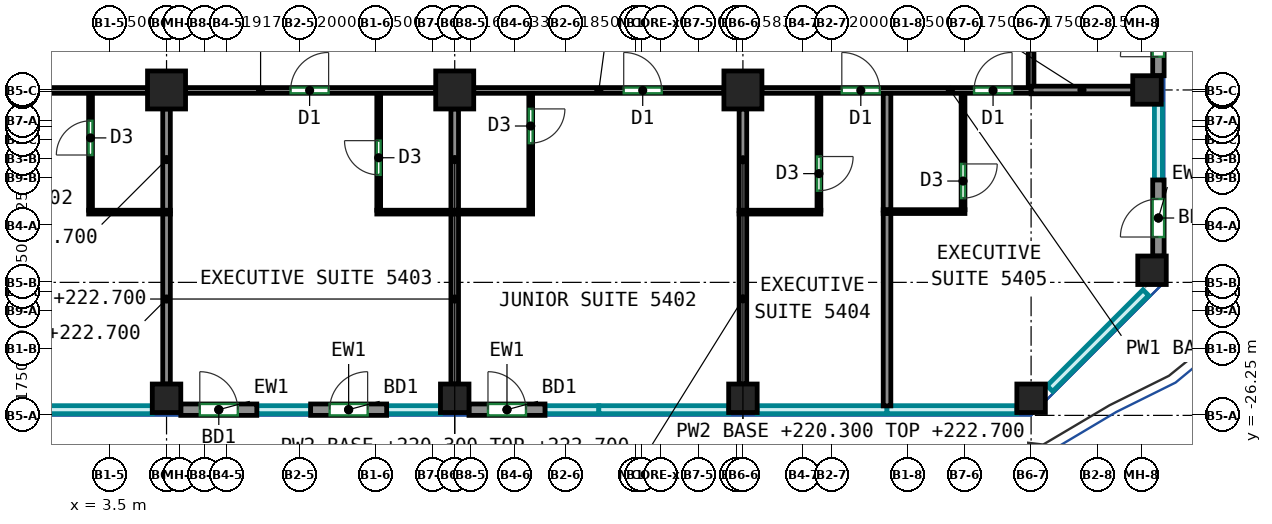
"""IFC4 building model, lengths in metres.
Left out: names, types, materials, properties, quantities, classifications, styles, units other than length and angle.
Written with IfcOpenShell. Run it as: python <this file> out.ifc"""

import sys

from ifc_helpers import new_model, si_unit, direction, frame, frame_2d, origin, origin_2d, place, context, subcontext, project, spatial, rectangle, extrude, source, transform, mapped, element, fill, save


model = new_model("IFC4")
c1 = context("Model", 3, precision=1e-05, world=origin(), true_north=direction((0.0, 1.0)))
c2 = subcontext(c1, "Body", "Model", "MODEL_VIEW")
j1 = project(units=[si_unit("LENGTHUNIT", "METRE"), si_unit("PLANEANGLEUNIT", "RADIAN")], contexts=[c1])
p1 = place(None, origin())
s1 = spatial("IfcSite", under=j1, at=p1, CompositionType="ELEMENT")
p2 = place(p1, origin())
s2 = spatial("IfcBuilding", under=s1, at=p2, CompositionType="ELEMENT")
p3 = place(p2, frame((0.0, 0.0, 220.3)))
s3 = spatial("IfcBuildingStorey", under=s2, at=p3, CompositionType="ELEMENT", Elevation=220.3)
m1 = source(origin(), c2, "Body", "SweptSolid", [
    extrude(rectangle(XDim=0.75, YDim=0.75, at=origin_2d()), origin(), (0.0, 0.0, 1.0), 3.0),
])
p4 = place(p3, frame((5.0, -25.8, 0.0), z_axis=(0.0, 0.0, 1.0), x_axis=(1.0, 0.0, 0.0)))
e1 = element("IfcColumn", 1, at=p4, inside=s3, PredefinedType="COLUMN", context=c2, shape_type="MappedRepresentation", body=[
    mapped(m1, transform((0.0, 0.0, 0.0))),
])
m2 = source(origin(), c2, "Body", "SweptSolid", [
    extrude(rectangle(XDim=1.0, YDim=1.0, at=origin_2d()), origin(), (0.0, 0.0, 1.0), 3.0),
])
p5 = place(p3, frame((5.0, -17.688, 0.0), z_axis=(0.0, 0.0, 1.0), x_axis=(1.0, 0.0, 0.0)))
e2 = element("IfcColumn", 2, at=p5, inside=s3, PredefinedType="COLUMN", context=c2, shape_type="MappedRepresentation", body=[
    mapped(m2, transform((0.0, 0.0, 0.0))),
])
p6 = place(p3, frame((12.583, -25.8, 0.0), z_axis=(0.0, 0.0, 1.0), x_axis=(1.0, 0.0, 0.0)))
e3 = element("IfcColumn", 3, at=p6, inside=s3, PredefinedType="COLUMN", context=c2, shape_type="MappedRepresentation", body=[
    mapped(m1, transform((0.0, 0.0, 0.0))),
])
p7 = place(p3, frame((12.583, -17.688, 0.0), z_axis=(0.0, 0.0, 1.0), x_axis=(1.0, 0.0, 0.0)))
e4 = element("IfcColumn", 4, at=p7, inside=s3, PredefinedType="COLUMN", context=c2, shape_type="MappedRepresentation", body=[
    mapped(m2, transform((0.0, 0.0, 0.0))),
])
p8 = place(p3, frame((20.167, -25.8, 0.0), z_axis=(0.0, 0.0, 1.0), x_axis=(1.0, 0.0, 0.0)))
e5 = element("IfcColumn", 5, at=p8, inside=s3, PredefinedType="COLUMN", context=c2, shape_type="MappedRepresentation", body=[
    mapped(m1, transform((0.0, 0.0, 0.0))),
])
p9 = place(p3, frame((20.167, -17.688, 0.0), z_axis=(0.0, 0.0, 1.0), x_axis=(1.0, 0.0, 0.0)))
e6 = element("IfcColumn", 6, at=p9, inside=s3, PredefinedType="COLUMN", context=c2, shape_type="MappedRepresentation", body=[
    mapped(m2, transform((0.0, 0.0, 0.0))),
])
for number, where, z_axis, x_axis in (
    (7, (27.75, -25.8, 0.0), (0.0, 0.0, 1.0), (1.0, 0.0, 0.0)),
    (8, (30.8, -17.688, 0.0), (0.0, 0.0, 1.0), (1.0, 0.0, 0.0)),
    (9, (30.932, -22.432, 0.0), (0.0, 0.0, 1.0), (1.0, 0.0, 0.0)),
):
    element("IfcColumn", number, at=place(p3, frame(where, z_axis=z_axis, x_axis=x_axis)), inside=s3, PredefinedType="COLUMN", context=c2, shape_type="MappedRepresentation", body=[
        mapped(m1, transform((0.0, 0.0, 0.0))),
    ])
m3 = source(origin(), c2, "Body", "SweptSolid", [
    extrude(rectangle(XDim=2.0, YDim=0.3, at=frame_2d((1.0, 0.0))), origin(), (0.0, 0.0, 1.0), 3.0),
])
p10 = place(p3, frame((5.375, -26.1, 0.0), z_axis=(0.0, 0.0, 1.0), x_axis=(1.0, 0.0, 0.0)))
e10 = element("IfcWall", 10, at=p10, inside=s3, PredefinedType="SOLIDWALL", context=c2, shape_type="MappedRepresentation", body=[
    mapped(m3, transform((0.0, 0.0, 0.0))),
])
p11 = place(p10, frame((0.5, 0.0, 0.0)))
e11 = element("IfcOpeningElement", 11, at=p11, cuts=e10, PredefinedType="OPENING", context=c2, shape_type="SweptSolid", body=[
    extrude(rectangle(XDim=1.0, YDim=2.1, at=frame_2d((0.5, 1.05))), frame((0.0, 0.16, 0.0), z_axis=(0.0, -1.0, 0.0), x_axis=(1.0, 0.0, 0.0)), (0.0, 0.0, 1.0), 0.32),
])
p12 = place(p3, frame((8.792, -26.1, 0.0), z_axis=(0.0, 0.0, 1.0), x_axis=(1.0, 0.0, 0.0)))
e12 = element("IfcWall", 12, at=p12, inside=s3, PredefinedType="SOLIDWALL", context=c2, shape_type="MappedRepresentation", body=[
    mapped(m3, transform((0.0, 0.0, 0.0))),
])
p13 = place(p12, frame((0.5, 0.0, 0.0)))
e13 = element("IfcOpeningElement", 13, at=p13, cuts=e12, PredefinedType="OPENING", context=c2, shape_type="SweptSolid", body=[
    extrude(rectangle(XDim=1.0, YDim=2.1, at=frame_2d((0.5, 1.05))), frame((0.0, 0.16, 0.0), z_axis=(0.0, -1.0, 0.0), x_axis=(1.0, 0.0, 0.0)), (0.0, 0.0, 1.0), 0.32),
])
p14 = place(p3, frame((12.958, -26.1, 0.0), z_axis=(0.0, 0.0, 1.0), x_axis=(1.0, 0.0, 0.0)))
e14 = element("IfcWall", 14, at=p14, inside=s3, PredefinedType="SOLIDWALL", context=c2, shape_type="MappedRepresentation", body=[
    mapped(m3, transform((0.0, 0.0, 0.0))),
])
p15 = place(p14, frame((0.5, 0.0, 0.0)))
e15 = element("IfcOpeningElement", 15, at=p15, cuts=e14, PredefinedType="OPENING", context=c2, shape_type="SweptSolid", body=[
    extrude(rectangle(XDim=1.0, YDim=2.1, at=frame_2d((0.5, 1.05))), frame((0.0, 0.16, 0.0), z_axis=(0.0, -1.0, 0.0), x_axis=(1.0, 0.0, 0.0)), (0.0, 0.0, 1.0), 0.32),
])
p16 = place(p3, frame((31.1, -22.057, 0.0), z_axis=(0.0, 0.0, 1.0), x_axis=(0.0, 1.0, 0.0)))
e16 = element("IfcWall", 16, at=p16, inside=s3, PredefinedType="SOLIDWALL", context=c2, shape_type="MappedRepresentation", body=[
    mapped(m3, transform((0.0, 0.0, 0.0))),
])
p17 = place(p16, frame((0.5, 0.0, 0.0)))
e17 = element("IfcOpeningElement", 17, at=p17, cuts=e16, PredefinedType="OPENING", context=c2, shape_type="SweptSolid", body=[
    extrude(rectangle(XDim=1.0, YDim=2.1, at=frame_2d((0.5, 1.05))), frame((0.0, 0.16, 0.0), z_axis=(0.0, -1.0, 0.0), x_axis=(1.0, 0.0, 0.0)), (0.0, 0.0, 1.0), 0.32),
])
p18 = place(p3, frame((31.1, -17.312, 0.0), z_axis=(0.0, 0.0, 1.0), x_axis=(0.0, 1.0, 0.0)))
e18 = element("IfcWall", 18, at=p18, inside=s3, PredefinedType="SOLIDWALL", context=c2, shape_type="MappedRepresentation", body=[
    mapped(m3, transform((0.0, 0.0, 0.0))),
])
p19 = place(p18, frame((0.5, 0.0, 0.0)))
e19 = element("IfcOpeningElement", 19, at=p19, cuts=e18, PredefinedType="OPENING", context=c2, shape_type="SweptSolid", body=[
    extrude(rectangle(XDim=1.0, YDim=2.1, at=frame_2d((0.5, 1.05))), frame((0.0, 0.16, 0.0), z_axis=(0.0, -1.0, 0.0), x_axis=(1.0, 0.0, 0.0)), (0.0, 0.0, 1.0), 0.32),
])
p20 = place(p3, frame((-2.083, -17.7, 0.0), z_axis=(0.0, 0.0, 1.0), x_axis=(1.0, 0.0, 0.0)))
e20 = element("IfcWall", 20, at=p20, inside=s3, PredefinedType="PARTITIONING", context=c2, shape_type="SweptSolid", body=[
    extrude(rectangle(XDim=6.583, YDim=0.15, at=frame_2d((3.292, 0.0))), origin(), (0.0, 0.0, 1.0), 2.4),
])
p21 = place(p20, frame((1.021, 0.0, 0.0)))
e21 = element("IfcOpeningElement", 21, at=p21, cuts=e20, PredefinedType="OPENING", context=c2, shape_type="SweptSolid", body=[
    extrude(rectangle(XDim=1.0, YDim=2.1, at=frame_2d((0.5, 1.05))), frame((0.0, 0.085, 0.0), z_axis=(0.0, -1.0, 0.0), x_axis=(1.0, 0.0, 0.0)), (0.0, 0.0, 1.0), 0.17),
])
p22 = place(p3, frame((5.5, -17.7, 0.0), z_axis=(0.0, 0.0, 1.0), x_axis=(1.0, 0.0, 0.0)))
e22 = element("IfcWall", 22, at=p22, inside=s3, PredefinedType="PARTITIONING", context=c2, shape_type="SweptSolid", body=[
    extrude(rectangle(XDim=6.583, YDim=0.15, at=frame_2d((3.292, 0.0))), origin(), (0.0, 0.0, 1.0), 2.4),
])
p23 = place(p22, frame((2.765, 0.0, 0.0)))
e23 = element("IfcOpeningElement", 23, at=p23, cuts=e22, PredefinedType="OPENING", context=c2, shape_type="SweptSolid", body=[
    extrude(rectangle(XDim=1.0, YDim=2.1, at=frame_2d((0.5, 1.05))), frame((0.0, 0.085, 0.0), z_axis=(0.0, -1.0, 0.0), x_axis=(1.0, 0.0, 0.0)), (0.0, 0.0, 1.0), 0.17),
])
p24 = place(p3, frame((13.083, -17.7, 0.0), z_axis=(0.0, 0.0, 1.0), x_axis=(1.0, 0.0, 0.0)))
e24 = element("IfcWall", 24, at=p24, inside=s3, PredefinedType="PARTITIONING", context=c2, shape_type="SweptSolid", body=[
    extrude(rectangle(XDim=6.584, YDim=0.15, at=frame_2d((3.292, 0.0))), origin(), (0.0, 0.0, 1.0), 2.4),
])
p25 = place(p24, frame((3.947, 0.0, 0.0)))
e25 = element("IfcOpeningElement", 25, at=p25, cuts=e24, PredefinedType="OPENING", context=c2, shape_type="SweptSolid", body=[
    extrude(rectangle(XDim=1.0, YDim=2.1, at=frame_2d((0.5, 1.05))), frame((0.0, 0.085, 0.0), z_axis=(0.0, -1.0, 0.0), x_axis=(1.0, 0.0, 0.0)), (0.0, 0.0, 1.0), 0.17),
])
p26 = place(p3, frame((20.667, -17.7, 0.0), z_axis=(0.0, 0.0, 1.0), x_axis=(1.0, 0.0, 0.0)))
e26 = element("IfcWall", 26, at=p26, inside=s3, PredefinedType="PARTITIONING", context=c2, shape_type="SweptSolid", body=[
    extrude(rectangle(XDim=7.083, YDim=0.15, at=frame_2d((3.542, 0.0))), origin(), (0.0, 0.0, 1.0), 2.4),
])
p27 = place(p26, frame((2.102, 0.0, 0.0)))
e27 = element("IfcOpeningElement", 27, at=p27, cuts=e26, PredefinedType="OPENING", context=c2, shape_type="SweptSolid", body=[
    extrude(rectangle(XDim=1.0, YDim=2.1, at=frame_2d((0.5, 1.05))), frame((0.0, 0.085, 0.0), z_axis=(0.0, -1.0, 0.0), x_axis=(1.0, 0.0, 0.0)), (0.0, 0.0, 1.0), 0.17),
])
p28 = place(p26, frame((5.582, 0.0, 0.0)))
e28 = element("IfcOpeningElement", 28, at=p28, cuts=e26, PredefinedType="OPENING", context=c2, shape_type="SweptSolid", body=[
    extrude(rectangle(XDim=1.0, YDim=2.1, at=frame_2d((0.5, 1.05))), frame((0.0, 0.085, 0.0), z_axis=(0.0, -1.0, 0.0), x_axis=(1.0, 0.0, 0.0)), (0.0, 0.0, 1.0), 0.17),
])
p29 = place(p3, frame((27.75, -17.598, 0.0), z_axis=(0.0, 0.0, 1.0), x_axis=(0.0, 1.0, 0.0)))
e29 = element("IfcWall", 29, at=p29, inside=s3, PredefinedType="PARTITIONING", context=c2, shape_type="SweptSolid", body=[
    extrude(rectangle(XDim=2.023, YDim=0.15, at=frame_2d((1.011, 0.0))), origin(), (0.0, 0.0, 1.0), 2.4),
])
p30 = place(p3, frame((3.0, -20.852, 0.0), z_axis=(0.0, 0.0, 1.0), x_axis=(0.0, 1.0, 0.0)))
e30 = element("IfcWall", 30, at=p30, inside=s3, PredefinedType="PARTITIONING", context=c2, shape_type="SweptSolid", body=[
    extrude(rectangle(XDim=3.075, YDim=0.1, at=frame_2d((1.538, 0.0))), origin(), (0.0, 0.0, 1.0), 3.0),
])
p31 = place(p30, frame((1.453, 0.0, 0.0)))
e31 = element("IfcOpeningElement", 31, at=p31, cuts=e30, PredefinedType="OPENING", context=c2, shape_type="SweptSolid", body=[
    extrude(rectangle(XDim=0.9, YDim=2.1, at=frame_2d((0.45, 1.05))), frame((0.0, 0.06, 0.0), z_axis=(0.0, -1.0, 0.0), x_axis=(1.0, 0.0, 0.0)), (0.0, 0.0, 1.0), 0.12),
])
p32 = place(p3, frame((2.95, -20.902, 0.0), z_axis=(0.0, 0.0, 1.0), x_axis=(1.0, 0.0, 0.0)))
e32 = element("IfcWall", 32, at=p32, inside=s3, PredefinedType="PARTITIONING", context=c2, shape_type="SweptSolid", body=[
    extrude(rectangle(XDim=2.15, YDim=0.1, at=frame_2d((1.075, 0.0))), origin(), (0.0, 0.0, 1.0), 3.0),
])
p33 = place(p3, frame((5.0, -25.425, 0.0), z_axis=(0.0, 0.0, 1.0), x_axis=(0.0, 1.0, 0.0)))
e33 = element("IfcWall", 33, at=p33, inside=s3, PredefinedType="PARTITIONING", context=c2, shape_type="SweptSolid", body=[
    extrude(rectangle(XDim=4.473, YDim=0.2, at=frame_2d((2.237, 0.0))), origin(), (0.0, 0.0, 1.0), 2.4),
])
p34 = place(p3, frame((5.0, -20.852, 0.0), z_axis=(0.0, 0.0, 1.0), x_axis=(0.0, 1.0, 0.0)))
e34 = element("IfcWall", 34, at=p34, inside=s3, PredefinedType="PARTITIONING", context=c2, shape_type="SweptSolid", body=[
    extrude(rectangle(XDim=2.664, YDim=0.2, at=frame_2d((1.332, 0.0))), origin(), (0.0, 0.0, 1.0), 2.4),
])
p35 = place(p3, frame((10.583, -20.852, 0.0), z_axis=(0.0, 0.0, 1.0), x_axis=(0.0, 1.0, 0.0)))
e35 = element("IfcWall", 35, at=p35, inside=s3, PredefinedType="PARTITIONING", context=c2, shape_type="SweptSolid", body=[
    extrude(rectangle(XDim=3.075, YDim=0.1, at=frame_2d((1.538, 0.0))), origin(), (0.0, 0.0, 1.0), 3.0),
])
p36 = place(p35, frame((0.931, 0.0, 0.0)))
e36 = element("IfcOpeningElement", 36, at=p36, cuts=e35, PredefinedType="OPENING", context=c2, shape_type="SweptSolid", body=[
    extrude(rectangle(XDim=0.9, YDim=2.1, at=frame_2d((0.45, 1.05))), frame((0.0, 0.06, 0.0), z_axis=(0.0, -1.0, 0.0), x_axis=(1.0, 0.0, 0.0)), (0.0, 0.0, 1.0), 0.12),
])
p37 = place(p3, frame((10.533, -20.902, 0.0), z_axis=(0.0, 0.0, 1.0), x_axis=(1.0, 0.0, 0.0)))
e37 = element("IfcWall", 37, at=p37, inside=s3, PredefinedType="PARTITIONING", context=c2, shape_type="SweptSolid", body=[
    extrude(rectangle(XDim=4.1, YDim=0.1, at=frame_2d((2.05, 0.0))), origin(), (0.0, 0.0, 1.0), 3.0),
])
p38 = place(p3, frame((12.583, -25.425, 0.0), z_axis=(0.0, 0.0, 1.0), x_axis=(0.0, 1.0, 0.0)))
e38 = element("IfcWall", 38, at=p38, inside=s3, PredefinedType="PARTITIONING", context=c2, shape_type="SweptSolid", body=[
    extrude(rectangle(XDim=4.473, YDim=0.2, at=frame_2d((2.237, 0.0))), origin(), (0.0, 0.0, 1.0), 2.4),
])
p39 = place(p3, frame((12.583, -20.852, 0.0), z_axis=(0.0, 0.0, 1.0), x_axis=(0.0, 1.0, 0.0)))
e39 = element("IfcWall", 39, at=p39, inside=s3, PredefinedType="PARTITIONING", context=c2, shape_type="SweptSolid", body=[
    extrude(rectangle(XDim=2.664, YDim=0.2, at=frame_2d((1.332, 0.0))), origin(), (0.0, 0.0, 1.0), 2.4),
])
p40 = place(p3, frame((14.583, -17.777, 0.0), z_axis=(0.0, 0.0, 1.0), x_axis=(0.0, -1.0, 0.0)))
e40 = element("IfcWall", 40, at=p40, inside=s3, PredefinedType="PARTITIONING", context=c2, shape_type="SweptSolid", body=[
    extrude(rectangle(XDim=3.075, YDim=0.1, at=frame_2d((1.538, 0.0))), origin(), (0.0, 0.0, 1.0), 3.0),
])
p41 = place(p40, frame((0.409, 0.0, 0.0)))
e41 = element("IfcOpeningElement", 41, at=p41, cuts=e40, PredefinedType="OPENING", context=c2, shape_type="SweptSolid", body=[
    extrude(rectangle(XDim=0.9, YDim=2.1, at=frame_2d((0.45, 1.05))), frame((0.0, 0.06, 0.0), z_axis=(0.0, -1.0, 0.0), x_axis=(1.0, 0.0, 0.0)), (0.0, 0.0, 1.0), 0.12),
])
p42 = place(p3, frame((20.167, -25.425, 0.0), z_axis=(0.0, 0.0, 1.0), x_axis=(0.0, 1.0, 0.0)))
e42 = element("IfcWall", 42, at=p42, inside=s3, PredefinedType="PARTITIONING", context=c2, shape_type="SweptSolid", body=[
    extrude(rectangle(XDim=4.483, YDim=0.2, at=frame_2d((2.242, 0.0))), origin(), (0.0, 0.0, 1.0), 2.4),
])
p43 = place(p3, frame((20.167, -20.862, 0.0), z_axis=(0.0, 0.0, 1.0), x_axis=(0.0, 1.0, 0.0)))
e43 = element("IfcWall", 43, at=p43, inside=s3, PredefinedType="PARTITIONING", context=c2, shape_type="SweptSolid", body=[
    extrude(rectangle(XDim=2.674, YDim=0.2, at=frame_2d((1.337, 0.0))), origin(), (0.0, 0.0, 1.0), 2.4),
])
p44 = place(p3, frame((22.167, -17.777, 0.0), z_axis=(0.0, 0.0, 1.0), x_axis=(0.0, -1.0, 0.0)))
e44 = element("IfcWall", 44, at=p44, inside=s3, PredefinedType="PARTITIONING", context=c2, shape_type="SweptSolid", body=[
    extrude(rectangle(XDim=3.075, YDim=0.1, at=frame_2d((1.538, 0.0))), origin(), (0.0, 0.0, 1.0), 3.0),
])
p45 = place(p44, frame((1.662, 0.0, 0.0)))
e45 = element("IfcOpeningElement", 45, at=p45, cuts=e44, PredefinedType="OPENING", context=c2, shape_type="SweptSolid", body=[
    extrude(rectangle(XDim=0.9, YDim=2.1, at=frame_2d((0.45, 1.05))), frame((0.0, 0.06, 0.0), z_axis=(0.0, -1.0, 0.0), x_axis=(1.0, 0.0, 0.0)), (0.0, 0.0, 1.0), 0.12),
])
p46 = place(p3, frame((20.067, -20.902, 0.0), z_axis=(0.0, 0.0, 1.0), x_axis=(1.0, 0.0, 0.0)))
e46 = element("IfcWall", 46, at=p46, inside=s3, PredefinedType="PARTITIONING", context=c2, shape_type="SweptSolid", body=[
    extrude(rectangle(XDim=2.15, YDim=0.1, at=frame_2d((1.075, 0.0))), origin(), (0.0, 0.0, 1.0), 3.0),
])
p47 = place(p3, frame((23.959, -26.0, 0.0), z_axis=(0.0, 0.0, 1.0), x_axis=(0.0, 1.0, 0.0)))
e47 = element("IfcWall", 47, at=p47, inside=s3, PredefinedType="PARTITIONING", context=c2, shape_type="SweptSolid", body=[
    extrude(rectangle(XDim=5.072, YDim=0.2, at=frame_2d((2.536, 0.0))), origin(), (0.0, 0.0, 1.0), 3.0),
])
p48 = place(p3, frame((23.959, -20.848, 0.0), z_axis=(0.0, 0.0, 1.0), x_axis=(0.0, 1.0, 0.0)))
e48 = element("IfcWall", 48, at=p48, inside=s3, PredefinedType="PARTITIONING", context=c2, shape_type="SweptSolid", body=[
    extrude(rectangle(XDim=3.071, YDim=0.2, at=frame_2d((1.535, 0.0))), origin(), (0.0, 0.0, 1.0), 3.0),
])
p49 = place(p3, frame((23.859, -20.888, 0.0), z_axis=(0.0, 0.0, 1.0), x_axis=(1.0, 0.0, 0.0)))
e49 = element("IfcWall", 49, at=p49, inside=s3, PredefinedType="PARTITIONING", context=c2, shape_type="SweptSolid", body=[
    extrude(rectangle(XDim=2.15, YDim=0.1, at=frame_2d((1.075, 0.0))), origin(), (0.0, 0.0, 1.0), 3.0),
])
p50 = place(p3, frame((25.959, -17.777, 0.0), z_axis=(0.0, 0.0, 1.0), x_axis=(0.0, -1.0, 0.0)))
e50 = element("IfcWall", 50, at=p50, inside=s3, PredefinedType="PARTITIONING", context=c2, shape_type="SweptSolid", body=[
    extrude(rectangle(XDim=3.061, YDim=0.1, at=frame_2d((1.53, 0.0))), origin(), (0.0, 0.0, 1.0), 3.0),
])
p51 = place(p50, frame((1.857, 0.0, 0.0)))
e51 = element("IfcOpeningElement", 51, at=p51, cuts=e50, PredefinedType="OPENING", context=c2, shape_type="SweptSolid", body=[
    extrude(rectangle(XDim=0.9, YDim=2.1, at=frame_2d((0.45, 1.05))), frame((0.0, 0.06, 0.0), z_axis=(0.0, -1.0, 0.0), x_axis=(1.0, 0.0, 0.0)), (0.0, 0.0, 1.0), 0.12),
])
p52 = place(p3, frame((27.752, -17.688, 0.0), z_axis=(0.0, 0.0, 1.0), x_axis=(1.0, 0.0, 0.0)))
e52 = element("IfcWall", 52, at=p52, inside=s3, PredefinedType="PARTITIONING", context=c2, shape_type="SweptSolid", body=[
    extrude(rectangle(XDim=2.673, YDim=0.2, at=frame_2d((1.336, 0.0))), origin(), (0.0, 0.0, 1.0), 2.4),
])
p53 = place(p11, origin())
e53 = element("IfcDoor", 53, at=p53, inside=s3, OperationType="SINGLE_SWING_LEFT", PredefinedType="DOOR", context=c2, shape_type="SweptSolid", body=[
    extrude(rectangle(XDim=1.0, YDim=2.1, at=frame_2d((0.5, 1.05))), frame((0.0, 0.025, 0.0), z_axis=(0.0, -1.0, 0.0), x_axis=(1.0, 0.0, 0.0)), (0.0, 0.0, 1.0), 0.05),
])
fill(e11, e53)
p54 = place(p13, origin())
e54 = element("IfcDoor", 54, at=p54, inside=s3, OperationType="SINGLE_SWING_RIGHT", PredefinedType="DOOR", context=c2, shape_type="SweptSolid", body=[
    extrude(rectangle(XDim=1.0, YDim=2.1, at=frame_2d((0.5, 1.05))), frame((0.0, 0.025, 0.0), z_axis=(0.0, -1.0, 0.0), x_axis=(1.0, 0.0, 0.0)), (0.0, 0.0, 1.0), 0.05),
])
fill(e13, e54)
p55 = place(p15, origin())
e55 = element("IfcDoor", 55, at=p55, inside=s3, OperationType="SINGLE_SWING_LEFT", PredefinedType="DOOR", context=c2, shape_type="SweptSolid", body=[
    extrude(rectangle(XDim=1.0, YDim=2.1, at=frame_2d((0.5, 1.05))), frame((0.0, 0.025, 0.0), z_axis=(0.0, -1.0, 0.0), x_axis=(1.0, 0.0, 0.0)), (0.0, 0.0, 1.0), 0.05),
])
fill(e15, e55)
p56 = place(p17, origin())
e56 = element("IfcDoor", 56, at=p56, inside=s3, OperationType="SINGLE_SWING_LEFT", PredefinedType="DOOR", context=c2, shape_type="SweptSolid", body=[
    extrude(rectangle(XDim=1.0, YDim=2.1, at=frame_2d((0.5, 1.05))), frame((0.0, 0.025, 0.0), z_axis=(0.0, -1.0, 0.0), x_axis=(1.0, 0.0, 0.0)), (0.0, 0.0, 1.0), 0.05),
])
fill(e17, e56)
p57 = place(p19, origin())
e57 = element("IfcDoor", 57, at=p57, inside=s3, OperationType="SINGLE_SWING_LEFT", PredefinedType="DOOR", context=c2, shape_type="SweptSolid", body=[
    extrude(rectangle(XDim=1.0, YDim=2.1, at=frame_2d((0.5, 1.05))), frame((0.0, 0.025, 0.0), z_axis=(0.0, -1.0, 0.0), x_axis=(1.0, 0.0, 0.0)), (0.0, 0.0, 1.0), 0.05),
])
fill(e19, e57)
p58 = place(p51, origin())
e58 = element("IfcDoor", 58, at=p58, inside=s3, OperationType="SINGLE_SWING_LEFT", PredefinedType="DOOR", context=c2, shape_type="SweptSolid", body=[
    extrude(rectangle(XDim=0.9, YDim=2.1, at=frame_2d((0.45, 1.05))), frame((0.0, 0.025, 0.0), z_axis=(0.0, -1.0, 0.0), x_axis=(1.0, 0.0, 0.0)), (0.0, 0.0, 1.0), 0.05),
])
fill(e51, e58)
p59 = place(p45, origin())
e59 = element("IfcDoor", 59, at=p59, inside=s3, OperationType="SINGLE_SWING_LEFT", PredefinedType="DOOR", context=c2, shape_type="SweptSolid", body=[
    extrude(rectangle(XDim=0.9, YDim=2.1, at=frame_2d((0.45, 1.05))), frame((0.0, 0.025, 0.0), z_axis=(0.0, -1.0, 0.0), x_axis=(1.0, 0.0, 0.0)), (0.0, 0.0, 1.0), 0.05),
])
fill(e45, e59)
p60 = place(p36, origin())
e60 = element("IfcDoor", 60, at=p60, inside=s3, OperationType="SINGLE_SWING_RIGHT", PredefinedType="DOOR", context=c2, shape_type="SweptSolid", body=[
    extrude(rectangle(XDim=0.9, YDim=2.1, at=frame_2d((0.45, 1.05))), frame((0.0, 0.025, 0.0), z_axis=(0.0, -1.0, 0.0), x_axis=(1.0, 0.0, 0.0)), (0.0, 0.0, 1.0), 0.05),
])
fill(e36, e60)
p61 = place(p31, origin())
e61 = element("IfcDoor", 61, at=p61, inside=s3, OperationType="SINGLE_SWING_LEFT", PredefinedType="DOOR", context=c2, shape_type="SweptSolid", body=[
    extrude(rectangle(XDim=0.9, YDim=2.1, at=frame_2d((0.45, 1.05))), frame((0.0, 0.025, 0.0), z_axis=(0.0, -1.0, 0.0), x_axis=(1.0, 0.0, 0.0)), (0.0, 0.0, 1.0), 0.05),
])
fill(e31, e61)
p62 = place(p41, origin())
e62 = element("IfcDoor", 62, at=p62, inside=s3, OperationType="SINGLE_SWING_LEFT", PredefinedType="DOOR", context=c2, shape_type="SweptSolid", body=[
    extrude(rectangle(XDim=0.9, YDim=2.1, at=frame_2d((0.45, 1.05))), frame((0.0, 0.025, 0.0), z_axis=(0.0, -1.0, 0.0), x_axis=(1.0, 0.0, 0.0)), (0.0, 0.0, 1.0), 0.05),
])
fill(e41, e62)
p63 = place(p23, origin())
e63 = element("IfcDoor", 63, at=p63, inside=s3, OperationType="SINGLE_SWING_RIGHT", PredefinedType="DOOR", context=c2, shape_type="SweptSolid", body=[
    extrude(rectangle(XDim=1.0, YDim=2.1, at=frame_2d((0.5, 1.05))), frame((0.0, 0.025, 0.0), z_axis=(0.0, -1.0, 0.0), x_axis=(1.0, 0.0, 0.0)), (0.0, 0.0, 1.0), 0.05),
])
fill(e23, e63)
p64 = place(p25, origin())
e64 = element("IfcDoor", 64, at=p64, inside=s3, OperationType="SINGLE_SWING_LEFT", PredefinedType="DOOR", context=c2, shape_type="SweptSolid", body=[
    extrude(rectangle(XDim=1.0, YDim=2.1, at=frame_2d((0.5, 1.05))), frame((0.0, 0.025, 0.0), z_axis=(0.0, -1.0, 0.0), x_axis=(1.0, 0.0, 0.0)), (0.0, 0.0, 1.0), 0.05),
])
fill(e25, e64)
p65 = place(p27, origin())
e65 = element("IfcDoor", 65, at=p65, inside=s3, OperationType="SINGLE_SWING_LEFT", PredefinedType="DOOR", context=c2, shape_type="SweptSolid", body=[
    extrude(rectangle(XDim=1.0, YDim=2.1, at=frame_2d((0.5, 1.05))), frame((0.0, 0.025, 0.0), z_axis=(0.0, -1.0, 0.0), x_axis=(1.0, 0.0, 0.0)), (0.0, 0.0, 1.0), 0.05),
])
fill(e27, e65)
p66 = place(p28, origin())
e66 = element("IfcDoor", 66, at=p66, inside=s3, OperationType="SINGLE_SWING_RIGHT", PredefinedType="DOOR", context=c2, shape_type="SweptSolid", body=[
    extrude(rectangle(XDim=1.0, YDim=2.1, at=frame_2d((0.5, 1.05))), frame((0.0, 0.025, 0.0), z_axis=(0.0, -1.0, 0.0), x_axis=(1.0, 0.0, 0.0)), (0.0, 0.0, 1.0), 0.05),
])
fill(e28, e66)
save(model, sys.argv[1])
